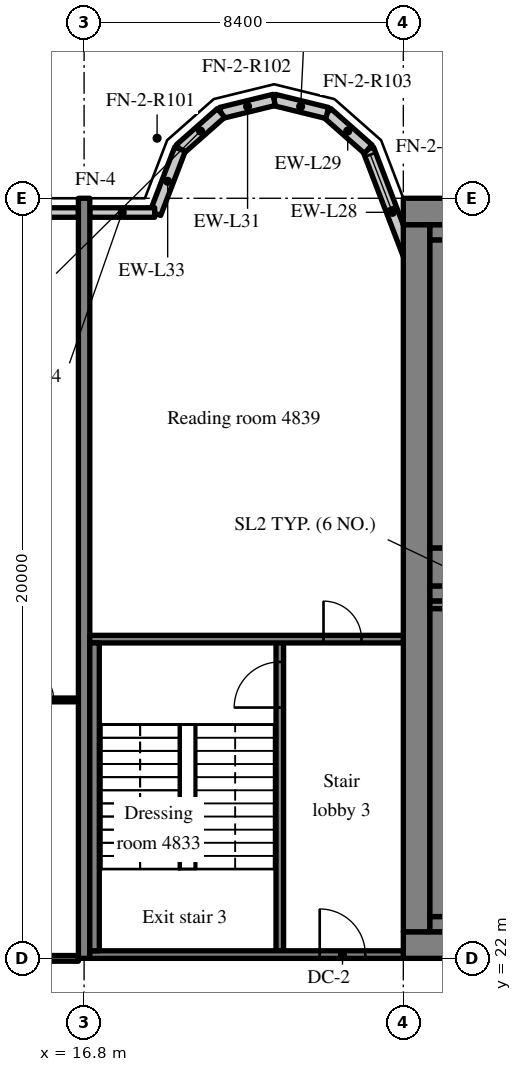
"""IFC4 building model, lengths in metres.
Left out: names, types, materials, properties, quantities, classifications, styles, units other than length and angle.
Written with IfcOpenShell. Run it as: python <this file> out.ifc"""

import sys

from ifc_helpers import new_model, si_unit, direction, frame, frame_2d, origin, place, context, subcontext, project, spatial, rectangle, extrude, source, transform, mapped, element, fill, save


model = new_model("IFC4")
c1 = context("Model", 3, precision=1e-05, world=origin(), true_north=direction((0.0, 1.0)))
c2 = subcontext(c1, "Body", "Model", "MODEL_VIEW")
j1 = project(units=[si_unit("LENGTHUNIT", "METRE"), si_unit("PLANEANGLEUNIT", "RADIAN")], contexts=[c1])
p1 = place(None, origin())
s1 = spatial("IfcSite", under=j1, at=p1, CompositionType="ELEMENT")
p2 = place(p1, origin())
s2 = spatial("IfcBuilding", under=s1, at=p2, CompositionType="ELEMENT")
p3 = place(p2, frame((0.0, 0.0, 197.2)))
s3 = spatial("IfcBuildingStorey", under=s2, at=p3, CompositionType="ELEMENT", Elevation=197.2)
m1 = source(origin(), c2, "Body", "SweptSolid", [
    extrude(rectangle(XDim=50.4, YDim=0.7, at=frame_2d((25.2, 0.0))), origin(), (0.0, 0.0, 1.0), 3.52),
])
p4 = place(p3, frame((25.2, 22.35, 0.0), z_axis=(0.0, 0.0, 1.0), x_axis=(1.0, 0.0, 0.0)))
e1 = element("IfcWall", 1, at=p4, inside=s3, PredefinedType="SHEAR", context=c2, shape_type="MappedRepresentation", body=[
    mapped(m1, transform((0.0, 0.0, 0.0), scale=1.0)),
])
m2 = source(origin(), c2, "Body", "SweptSolid", [
    extrude(rectangle(XDim=1.8, YDim=2.1, at=frame_2d((0.9, 1.05))), frame((0.0, 0.36, 0.0), z_axis=(0.0, -1.0, 0.0), x_axis=(1.0, 0.0, 0.0)), (0.0, 0.0, 1.0), 0.72),
])
p5 = place(p4, frame((15.9, 0.0, 0.0)))
e2 = element("IfcOpeningElement", 2, at=p5, cuts=e1, PredefinedType="OPENING", context=c2, shape_type="MappedRepresentation", body=[
    mapped(m2, transform((0.0, 0.0, 0.0), scale=1.0)),
])
m3 = source(origin(), c2, "Body", "SweptSolid", [
    extrude(rectangle(XDim=0.9, YDim=2.1, at=frame_2d((0.45, 1.05))), frame((0.0, 0.36, 0.0), z_axis=(0.0, -1.0, 0.0), x_axis=(1.0, 0.0, 0.0)), (0.0, 0.0, 1.0), 0.72),
])
p6 = place(p4, frame((21.5, 0.0, 0.0)))
e3 = element("IfcOpeningElement", 3, at=p6, cuts=e1, PredefinedType="OPENING", context=c2, shape_type="MappedRepresentation", body=[
    mapped(m3, transform((0.0, 0.0, 0.0), scale=1.0)),
])
p7 = place(p4, frame((32.7, 0.0, 0.0)))
e4 = element("IfcOpeningElement", 4, at=p7, cuts=e1, PredefinedType="OPENING", context=c2, shape_type="MappedRepresentation", body=[
    mapped(m2, transform((0.0, 0.0, 0.0), scale=1.0)),
])
m4 = source(origin(), c2, "Body", "SweptSolid", [
    extrude(rectangle(XDim=1.2, YDim=2.1, at=frame_2d((0.6, 1.05))), frame((0.0, 0.36, 0.0), z_axis=(0.0, -1.0, 0.0), x_axis=(1.0, 0.0, 0.0)), (0.0, 0.0, 1.0), 0.72),
])
p8 = place(p4, frame((6.475, 0.0, 0.0)))
e5 = element("IfcOpeningElement", 5, at=p8, cuts=e1, PredefinedType="OPENING", context=c2, shape_type="MappedRepresentation", body=[
    mapped(m4, transform((0.0, 0.0, 0.0), scale=1.0)),
])
p9 = place(p4, frame((47.875, 0.0, 0.0)))
e6 = element("IfcOpeningElement", 6, at=p9, cuts=e1, PredefinedType="OPENING", context=c2, shape_type="MappedRepresentation", body=[
    mapped(m4, transform((0.0, 0.0, 0.0), scale=1.0)),
])
p10 = place(p3, frame((25.2, 41.65, 0.0), z_axis=(0.0, 0.0, 1.0), x_axis=(1.0, 0.0, 0.0)))
e7 = element("IfcWall", 7, at=p10, inside=s3, PredefinedType="SHEAR", context=c2, shape_type="MappedRepresentation", body=[
    mapped(m1, transform((0.0, 0.0, 0.0), scale=1.0)),
])
m5 = source(origin(), c2, "Body", "SweptSolid", [
    extrude(rectangle(XDim=18.6, YDim=0.7, at=frame_2d((9.3, 0.0))), origin(), (0.0, 0.0, 1.0), 3.52),
])
p11 = place(p3, frame((25.55, 22.7, 0.0), z_axis=(0.0, 0.0, 1.0), x_axis=(0.0, 1.0, 0.0)))
e8 = element("IfcWall", 8, at=p11, inside=s3, PredefinedType="SHEAR", context=c2, shape_type="MappedRepresentation", body=[
    mapped(m5, transform((0.0, 0.0, 0.0), scale=1.0)),
])
m6 = source(origin(), c2, "Body", "SweptSolid", [
    extrude(rectangle(XDim=7.5, YDim=0.4, at=frame_2d((3.75, 0.0))), origin(), (0.0, 0.0, 1.0), 3.52),
])
p12 = place(p3, frame((25.9, 31.6, 0.0), z_axis=(0.0, 0.0, 1.0), x_axis=(1.0, 0.0, 0.0)))
e9 = element("IfcWall", 9, at=p12, inside=s3, PredefinedType="SHEAR", context=c2, shape_type="MappedRepresentation", body=[
    mapped(m6, transform((0.0, 0.0, 0.0), scale=1.0)),
])
m7 = source(origin(), c2, "Body", "SweptSolid", [
    extrude(rectangle(XDim=1.1, YDim=2.1, at=frame_2d((0.55, 1.05))), frame((0.0, 0.21, 0.0), z_axis=(0.0, -1.0, 0.0), x_axis=(1.0, 0.0, 0.0)), (0.0, 0.0, 1.0), 0.42),
])
p13 = place(p12, frame((5.825, 0.0, 0.0)))
e10 = element("IfcOpeningElement", 10, at=p13, cuts=e9, PredefinedType="OPENING", context=c2, shape_type="MappedRepresentation", body=[
    mapped(m7, transform((0.0, 0.0, 0.0), scale=1.0)),
])
m8 = source(origin(), c2, "Body", "SweptSolid", [
    extrude(rectangle(XDim=20.0, YDim=0.3, at=frame_2d((10.0, 0.0))), origin(), (0.0, 0.0, 1.0), 3.52),
])
p14 = place(p3, frame((16.8, 22.0, 0.0), z_axis=(0.0, 0.0, 1.0), x_axis=(0.0, 1.0, 0.0)))
e11 = element("IfcWall", 11, at=p14, inside=s3, PredefinedType="SHEAR", context=c2, shape_type="MappedRepresentation", body=[
    mapped(m8, transform((0.0, 0.0, 0.0), scale=1.0)),
])
m9 = source(origin(), c2, "Body", "SweptSolid", [
    extrude(rectangle(XDim=3.559, YDim=0.3, at=frame_2d((1.78, 0.0))), origin(), (0.0, 0.0, 1.0), 3.52),
])
p15 = place(p3, frame((25.55, 39.969, 0.0), z_axis=(0.0, 0.0, 1.0), x_axis=(-0.35779745313, 0.933799219604, 0.0)))
e12 = element("IfcWall", 12, at=p15, inside=s3, PredefinedType="SOLIDWALL", context=c2, shape_type="MappedRepresentation", body=[
    mapped(m9, transform((0.0, 0.0, 0.0), scale=1.0)),
])
m10 = source(origin(), c2, "Body", "SweptSolid", [
    extrude(rectangle(XDim=1.5, YDim=2.0, at=frame_2d((0.75, 1.0))), frame((0.0, 0.16, 0.0), z_axis=(0.0, -1.0, 0.0), x_axis=(1.0, 0.0, 0.0)), (0.0, 0.0, 1.0), 0.32),
])
p16 = place(p15, frame((1.903, 0.0, 0.9)))
e13 = element("IfcOpeningElement", 13, at=p16, cuts=e12, PredefinedType="OPENING", context=c2, shape_type="MappedRepresentation", body=[
    mapped(m10, transform((0.0, 0.0, 0.0), scale=1.0)),
])
m11 = source(origin(), c2, "Body", "SweptSolid", [
    extrude(rectangle(XDim=1.44, YDim=0.3, at=frame_2d((0.72, 0.0))), origin(), (0.0, 0.0, 1.0), 3.52),
])
p17 = place(p3, frame((24.277, 43.292, 0.0), z_axis=(0.0, 0.0, 1.0), x_axis=(-0.749649827867, 0.661834673902, 0.0)))
e14 = element("IfcWall", 14, at=p17, inside=s3, PredefinedType="SOLIDWALL", context=c2, shape_type="MappedRepresentation", body=[
    mapped(m11, transform((0.0, 0.0, 0.0), scale=1.0)),
])
m12 = source(origin(), c2, "Body", "SweptSolid", [
    extrude(rectangle(XDim=1.438, YDim=0.3, at=frame_2d((0.719, 0.0))), origin(), (0.0, 0.0, 1.0), 3.52),
])
p18 = place(p3, frame((23.197, 44.245, 0.0), z_axis=(0.0, 0.0, 1.0), x_axis=(-0.971152283879, 0.238460146601, 0.0)))
e15 = element("IfcWall", 15, at=p18, inside=s3, PredefinedType="SOLIDWALL", context=c2, shape_type="MappedRepresentation", body=[
    mapped(m12, transform((0.0, 0.0, 0.0), scale=1.0)),
])
m13 = source(origin(), c2, "Body", "SweptSolid", [
    extrude(rectangle(XDim=1.439, YDim=0.3, at=frame_2d((0.719, 0.0))), origin(), (0.0, 0.0, 1.0), 3.52),
])
p19 = place(p3, frame((21.8, 44.588, 0.0), z_axis=(0.0, 0.0, 1.0), x_axis=(-0.971161932466, -0.238420848351, 0.0)))
e16 = element("IfcWall", 16, at=p19, inside=s3, PredefinedType="SOLIDWALL", context=c2, shape_type="MappedRepresentation", body=[
    mapped(m13, transform((0.0, 0.0, 0.0), scale=1.0)),
])
m14 = source(origin(), c2, "Body", "SweptSolid", [
    extrude(rectangle(XDim=1.44, YDim=0.3, at=frame_2d((0.72, 0.0))), origin(), (0.0, 0.0, 1.0), 3.52),
])
p20 = place(p3, frame((20.403, 44.245, 0.0), z_axis=(0.0, 0.0, 1.0), x_axis=(-0.74957555648, -0.661918790432, 0.0)))
e17 = element("IfcWall", 17, at=p20, inside=s3, PredefinedType="SOLIDWALL", context=c2, shape_type="MappedRepresentation", body=[
    mapped(m14, transform((0.0, 0.0, 0.0), scale=1.0)),
])
m15 = source(origin(), c2, "Body", "SweptSolid", [
    extrude(rectangle(XDim=1.812, YDim=0.3, at=frame_2d((0.906, 0.0))), origin(), (0.0, 0.0, 1.0), 3.52),
])
p21 = place(p3, frame((19.323, 43.292, 0.0), z_axis=(0.0, 0.0, 1.0), x_axis=(-0.357877270961, -0.93376863244, 0.0)))
e18 = element("IfcWall", 18, at=p21, inside=s3, PredefinedType="SOLIDWALL", context=c2, shape_type="MappedRepresentation", body=[
    mapped(m15, transform((0.0, 0.0, 0.0), scale=1.0)),
])
m16 = source(origin(), c2, "Body", "SweptSolid", [
    extrude(rectangle(XDim=4.094, YDim=0.25, at=frame_2d((2.047, 0.0))), origin(), (0.0, 0.0, 1.0), 2.87),
])
p22 = place(p3, frame((16.65, 41.625, 0.0), z_axis=(0.0, 0.0, 1.0), x_axis=(-1.0, 0.0, 0.0)))
e19 = element("IfcWall", 19, at=p22, inside=s3, PredefinedType="SOLIDWALL", context=c2, shape_type="MappedRepresentation", body=[
    mapped(m16, transform((0.0, 0.0, 0.0), scale=1.0)),
])
m17 = source(origin(), c2, "Body", "SweptSolid", [
    extrude(rectangle(XDim=1.5, YDim=1.5, at=frame_2d((0.75, 0.75))), frame((0.0, 0.135, 0.0), z_axis=(0.0, -1.0, 0.0), x_axis=(1.0, 0.0, 0.0)), (0.0, 0.0, 1.0), 0.27),
])
p23 = place(p22, frame((1.297, 0.0, 0.9)))
e20 = element("IfcOpeningElement", 20, at=p23, cuts=e19, PredefinedType="OPENING", context=c2, shape_type="MappedRepresentation", body=[
    mapped(m17, transform((0.0, 0.0, 0.0), scale=1.0)),
])
m18 = source(origin(), c2, "Body", "SweptSolid", [
    extrude(rectangle(XDim=1.708, YDim=0.25, at=frame_2d((0.854, 0.0))), origin(), (0.0, 0.0, 1.0), 2.87),
])
p24 = place(p3, frame((18.658, 41.625, 0.0), z_axis=(0.0, 0.0, 1.0), x_axis=(-1.0, 0.0, 0.0)))
e21 = element("IfcWall", 21, at=p24, inside=s3, PredefinedType="SOLIDWALL", context=c2, shape_type="MappedRepresentation", body=[
    mapped(m18, transform((0.0, 0.0, 0.0), scale=1.0)),
])
m19 = source(origin(), c2, "Body", "SweptSolid", [
    extrude(rectangle(XDim=8.3, YDim=0.2, at=frame_2d((4.15, 0.0))), origin(), (0.0, 0.0, 1.0), 3.52),
])
p25 = place(p3, frame((21.95, 22.1, 0.0), z_axis=(0.0, 0.0, 1.0), x_axis=(0.0, 1.0, 0.0)))
e22 = element("IfcWall", 22, at=p25, inside=s3, PredefinedType="SOLIDWALL", context=c2, shape_type="MappedRepresentation", body=[
    mapped(m19, transform((0.0, 0.0, 0.0), scale=1.0)),
])
m20 = source(origin(), c2, "Body", "SweptSolid", [
    extrude(rectangle(XDim=1.2, YDim=2.1, at=frame_2d((0.6, 1.05))), frame((0.0, 0.11, 0.0), z_axis=(0.0, -1.0, 0.0), x_axis=(1.0, 0.0, 0.0)), (0.0, 0.0, 1.0), 0.22),
])
p26 = place(p25, frame((6.5, 0.0, 0.0)))
e23 = element("IfcOpeningElement", 23, at=p26, cuts=e22, PredefinedType="OPENING", context=c2, shape_type="MappedRepresentation", body=[
    mapped(m20, transform((0.0, 0.0, 0.0), scale=1.0)),
])
m21 = source(origin(), c2, "Body", "SweptSolid", [
    extrude(rectangle(XDim=8.25, YDim=0.2, at=frame_2d((4.125, 0.0))), origin(), (0.0, 0.0, 1.0), 3.52),
])
p27 = place(p3, frame((16.95, 22.1, 0.0), z_axis=(0.0, 0.0, 1.0), x_axis=(1.0, 0.0, 0.0)))
e24 = element("IfcWall", 24, at=p27, inside=s3, PredefinedType="SOLIDWALL", context=c2, shape_type="MappedRepresentation", body=[
    mapped(m21, transform((0.0, 0.0, 0.0), scale=1.0)),
])
p28 = place(p27, frame((6.05, 0.0, 0.0)))
e25 = element("IfcOpeningElement", 25, at=p28, cuts=e24, PredefinedType="OPENING", context=c2, shape_type="MappedRepresentation", body=[
    mapped(m20, transform((0.0, 0.0, 0.0), scale=1.0)),
])
p29 = place(p3, frame((16.95, 30.4, 0.0), z_axis=(0.0, 0.0, 1.0), x_axis=(1.0, 0.0, 0.0)))
e26 = element("IfcWall", 26, at=p29, inside=s3, PredefinedType="SOLIDWALL", context=c2, shape_type="MappedRepresentation", body=[
    mapped(m21, transform((0.0, 0.0, 0.0), scale=1.0)),
])
m22 = source(origin(), c2, "Body", "SweptSolid", [
    extrude(rectangle(XDim=1.0, YDim=2.1, at=frame_2d((0.5, 1.05))), frame((0.0, 0.11, 0.0), z_axis=(0.0, -1.0, 0.0), x_axis=(1.0, 0.0, 0.0)), (0.0, 0.0, 1.0), 0.22),
])
p30 = place(p29, frame((6.15, 0.0, 0.0)))
e27 = element("IfcOpeningElement", 27, at=p30, cuts=e26, PredefinedType="OPENING", context=c2, shape_type="MappedRepresentation", body=[
    mapped(m22, transform((0.0, 0.0, 0.0), scale=1.0)),
])
m23 = source(origin(), c2, "Body", "SweptSolid", [
    extrude(rectangle(XDim=5.05, YDim=0.4, at=frame_2d((2.525, 0.0))), origin(), (0.0, 0.0, 1.0), 3.52),
])
p31 = place(p3, frame((25.9, 22.9, 0.0), z_axis=(0.0, 0.0, 1.0), x_axis=(1.0, 0.0, 0.0)))
e28 = element("IfcWall", 28, at=p31, inside=s3, PredefinedType="SOLIDWALL", context=c2, shape_type="MappedRepresentation", body=[
    mapped(m23, transform((0.0, 0.0, 0.0), scale=1.0)),
])
m24 = source(origin(), c2, "Body", "SweptSolid", [
    extrude(rectangle(XDim=5.05, YDim=0.2, at=frame_2d((2.525, 0.0))), origin(), (0.0, 0.0, 1.0), 3.52),
])
p32 = place(p3, frame((25.9, 31.3, 0.0), z_axis=(0.0, 0.0, 1.0), x_axis=(1.0, 0.0, 0.0)))
e29 = element("IfcWall", 29, at=p32, inside=s3, PredefinedType="SOLIDWALL", context=c2, shape_type="MappedRepresentation", body=[
    mapped(m24, transform((0.0, 0.0, 0.0), scale=1.0)),
])
m25 = source(origin(), c2, "Body", "SweptSolid", [
    extrude(rectangle(XDim=8.1, YDim=0.4, at=frame_2d((4.05, 0.0))), origin(), (0.0, 0.0, 1.0), 3.52),
])
p33 = place(p3, frame((26.1, 23.1, 0.0), z_axis=(0.0, 0.0, 1.0), x_axis=(0.0, 1.0, 0.0)))
e30 = element("IfcWall", 30, at=p33, inside=s3, PredefinedType="SOLIDWALL", context=c2, shape_type="MappedRepresentation", body=[
    mapped(m25, transform((0.0, 0.0, 0.0), scale=1.0)),
])
m26 = source(origin(), c2, "Body", "SweptSolid", [
    extrude(rectangle(XDim=8.1, YDim=0.25, at=frame_2d((4.05, 0.0))), origin(), (0.0, 0.0, 1.0), 3.52),
])
p34 = place(p3, frame((17.075, 22.2, 0.0), z_axis=(0.0, 0.0, 1.0), x_axis=(0.0, 1.0, 0.0)))
e31 = element("IfcWall", 31, at=p34, inside=s3, PredefinedType="SOLIDWALL", context=c2, shape_type="MappedRepresentation", body=[
    mapped(m26, transform((0.0, 0.0, 0.0), scale=1.0)),
])
p35 = place(p3, frame((25.9, 41.1, 0.0), z_axis=(0.0, 0.0, 1.0), x_axis=(1.0, 0.0, 0.0)))
e32 = element("IfcWall", 32, at=p35, inside=s3, PredefinedType="SOLIDWALL", context=c2, shape_type="MappedRepresentation", body=[
    mapped(m23, transform((0.0, 0.0, 0.0), scale=1.0)),
])
m27 = source(origin(), c2, "Body", "SweptSolid", [
    extrude(rectangle(XDim=5.05, YDim=1.0, at=frame_2d((2.525, 0.0))), origin(), (0.0, 0.0, 1.0), 3.52),
])
p36 = place(p3, frame((25.9, 32.3, 0.0), z_axis=(0.0, 0.0, 1.0), x_axis=(1.0, 0.0, 0.0)))
e33 = element("IfcWall", 33, at=p36, inside=s3, PredefinedType="SOLIDWALL", context=c2, shape_type="MappedRepresentation", body=[
    mapped(m27, transform((0.0, 0.0, 0.0), scale=1.0)),
])
p37 = place(p3, frame((26.1, 32.8, 0.0), z_axis=(0.0, 0.0, 1.0), x_axis=(0.0, 1.0, 0.0)))
e34 = element("IfcWall", 34, at=p37, inside=s3, PredefinedType="SOLIDWALL", context=c2, shape_type="MappedRepresentation", body=[
    mapped(m25, transform((0.0, 0.0, 0.0), scale=1.0)),
])
m28 = source(origin(), c2, "Body", "SweptSolid", [
    extrude(rectangle(XDim=2.2, YDim=0.1, at=frame_2d((1.1, 0.0))), origin(), (0.0, 0.0, 1.0), 3.52),
])
p38 = place(p3, frame((14.45, 28.8, 0.0), z_axis=(0.0, 0.0, 1.0), x_axis=(1.0, 0.0, 0.0)))
e35 = element("IfcWall", 35, at=p38, inside=s3, PredefinedType="PARTITIONING", context=c2, shape_type="MappedRepresentation", body=[
    mapped(m28, transform((0.0, 0.0, 0.0), scale=1.0)),
])
m29 = source(origin(), c2, "Body", "SweptSolid", [
    extrude(rectangle(XDim=0.9, YDim=2.1, at=frame_2d((0.45, 1.05))), frame((0.0, 0.06, 0.0), z_axis=(0.0, -1.0, 0.0), x_axis=(1.0, 0.0, 0.0)), (0.0, 0.0, 1.0), 0.12),
])
p39 = place(p38, frame((0.65, 0.0, 0.0)))
e36 = element("IfcOpeningElement", 36, at=p39, cuts=e35, PredefinedType="OPENING", context=c2, shape_type="MappedRepresentation", body=[
    mapped(m29, transform((0.0, 0.0, 0.0), scale=1.0)),
])
m30 = source(origin(), c2, "Body", "SweptSolid", [
    extrude(rectangle(XDim=7.95, YDim=0.15, at=frame_2d((3.975, 0.0))), origin(), (0.0, 0.0, 1.0), 2.82),
])
p40 = place(p3, frame((8.7, 22.0, 0.0), z_axis=(0.0, 0.0, 1.0), x_axis=(1.0, 0.0, 0.0)))
e37 = element("IfcWall", 37, at=p40, inside=s3, PredefinedType="PARTITIONING", context=c2, shape_type="MappedRepresentation", body=[
    mapped(m30, transform((0.0, 0.0, 0.0), scale=1.0)),
])
m31 = source(origin(), c2, "Body", "SweptSolid", [
    extrude(rectangle(XDim=1.0, YDim=2.1, at=frame_2d((0.5, 1.05))), frame((0.0, 0.085, 0.0), z_axis=(0.0, -1.0, 0.0), x_axis=(1.0, 0.0, 0.0)), (0.0, 0.0, 1.0), 0.17),
])
p41 = place(p40, frame((0.55, 0.0, 0.0)))
e38 = element("IfcOpeningElement", 38, at=p41, cuts=e37, PredefinedType="OPENING", context=c2, shape_type="MappedRepresentation", body=[
    mapped(m31, transform((0.0, 0.0, 0.0), scale=1.0)),
])
m32 = source(origin(), c2, "Body", "SweptSolid", [
    extrude(rectangle(XDim=1.5, YDim=2.0, at=frame_2d((0.75, 1.0))), frame((0.0, 0.03, 0.0), z_axis=(0.0, -1.0, 0.0), x_axis=(1.0, 0.0, 0.0)), (0.0, 0.0, 1.0), 0.06),
])
p42 = place(p16, origin())
e39 = element("IfcWindow", 39, at=p42, inside=s3, PartitioningType="SINGLE_PANEL", PredefinedType="WINDOW", context=c2, shape_type="MappedRepresentation", body=[
    mapped(m32, transform((0.0, 0.0, 0.0), scale=1.0)),
])
fill(e13, e39)
m33 = source(origin(), c2, "Body", "SweptSolid", [
    extrude(rectangle(XDim=1.2, YDim=2.1, at=frame_2d((0.6, 1.05))), frame((0.0, 0.025, 0.0), z_axis=(0.0, -1.0, 0.0), x_axis=(1.0, 0.0, 0.0)), (0.0, 0.0, 1.0), 0.05),
])
p43 = place(p26, origin())
e40 = element("IfcDoor", 40, at=p43, inside=s3, OperationType="SINGLE_SWING_LEFT", PredefinedType="DOOR", context=c2, shape_type="MappedRepresentation", body=[
    mapped(m33, transform((0.0, 0.0, 0.0), scale=1.0)),
])
fill(e23, e40)
p44 = place(p28, origin())
e41 = element("IfcDoor", 41, at=p44, inside=s3, OperationType="SINGLE_SWING_LEFT", PredefinedType="DOOR", context=c2, shape_type="MappedRepresentation", body=[
    mapped(m33, transform((0.0, 0.0, 0.0), scale=1.0)),
])
fill(e25, e41)
m34 = source(origin(), c2, "Body", "SweptSolid", [
    extrude(rectangle(XDim=1.0, YDim=2.1, at=frame_2d((0.5, 1.05))), frame((0.0, 0.025, 0.0), z_axis=(0.0, -1.0, 0.0), x_axis=(1.0, 0.0, 0.0)), (0.0, 0.0, 1.0), 0.05),
])
p45 = place(p30, origin())
e42 = element("IfcDoor", 42, at=p45, inside=s3, OperationType="SINGLE_SWING_LEFT", PredefinedType="DOOR", context=c2, shape_type="MappedRepresentation", body=[
    mapped(m34, transform((0.0, 0.0, 0.0), scale=1.0)),
])
fill(e27, e42)
m35 = source(origin(), c2, "Body", "SweptSolid", [
    extrude(rectangle(XDim=0.9, YDim=2.1, at=frame_2d((0.45, 1.05))), frame((0.0, 0.025, 0.0), z_axis=(0.0, -1.0, 0.0), x_axis=(1.0, 0.0, 0.0)), (0.0, 0.0, 1.0), 0.05),
])
p46 = place(p39, origin())
e43 = element("IfcDoor", 43, at=p46, inside=s3, OperationType="SINGLE_SWING_LEFT", PredefinedType="DOOR", context=c2, shape_type="MappedRepresentation", body=[
    mapped(m35, transform((0.0, 0.0, 0.0), scale=1.0)),
])
fill(e36, e43)
save(model, sys.argv[1])
